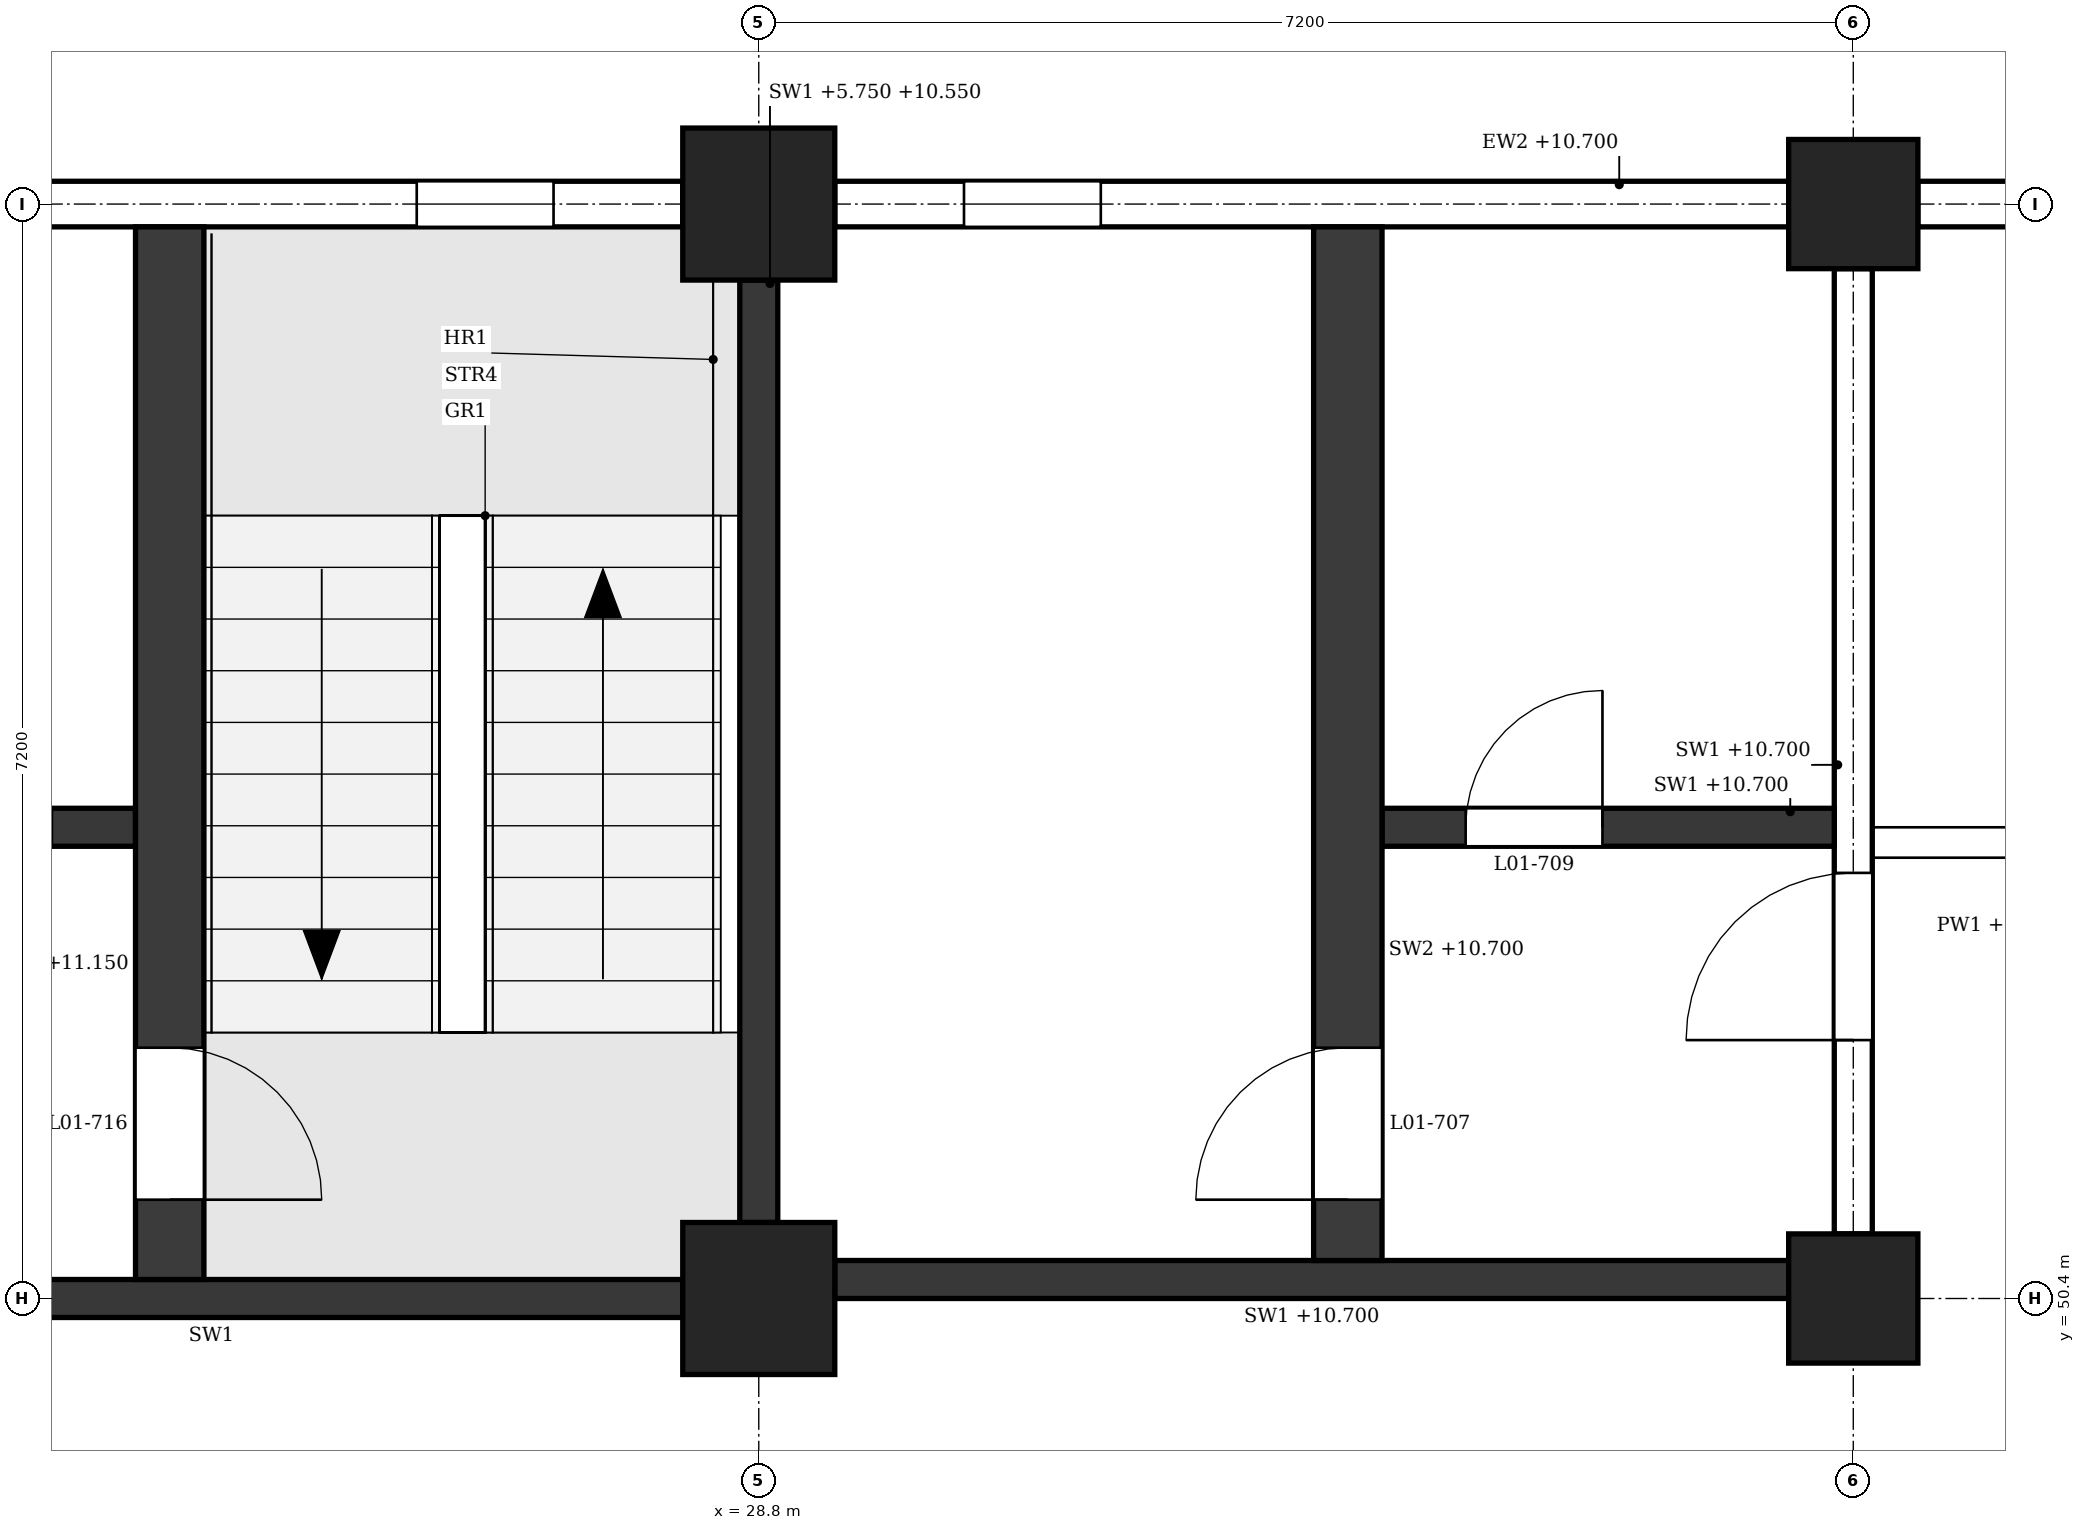
"""IFC4 building model, lengths in metres.
Left out: names, types, materials, properties, quantities, classifications, styles, units other than length and angle.
Written with IfcOpenShell. Run it as: python <this file> out.ifc"""

import sys

from ifc_helpers import new_model, si_unit, direction, frame, frame_2d, origin, origin_2d, place, context, subcontext, project, spatial, polyline, rectangle, outline, extrude, element, fill, save


model = new_model("IFC4")
c1 = context("Model", 3, precision=1e-05, world=origin(), true_north=direction((0.0, 1.0)))
c2 = subcontext(c1, "Body", "Model", "MODEL_VIEW")
j1 = project(units=[si_unit("LENGTHUNIT", "METRE"), si_unit("PLANEANGLEUNIT", "RADIAN")], contexts=[c1])
p1 = place(None, origin())
s1 = spatial("IfcSite", under=j1, at=p1, CompositionType="ELEMENT")
p2 = place(p1, origin())
s2 = spatial("IfcBuilding", under=s1, at=p2, CompositionType="ELEMENT")
p3 = place(p2, frame((0.0, 0.0, 6.0)))
s3 = spatial("IfcBuildingStorey", under=s2, at=p3, CompositionType="ELEMENT", Elevation=6.0)
for number, where, z_axis, x_axis in (
    (1, (28.8, 50.4, 0.0), (0.0, 0.0, 1.0), (1.0, 0.0, 0.0)),
    (2, (28.8, 57.6, 0.0), (0.0, 0.0, 1.0), (1.0, 0.0, 0.0)),
):
    element("IfcColumn", number, at=place(p3, frame(where, z_axis=z_axis, x_axis=x_axis)), inside=s3, PredefinedType="COLUMN", context=c2, shape_type="SweptSolid", body=[
        extrude(rectangle(XDim=1.0, YDim=1.0, at=origin_2d()), origin(), (0.0, 0.0, 1.0), 5.4),
    ])
for number, where, z_axis, x_axis in (
    (3, (36.0, 50.4, 0.0), (0.0, 0.0, 1.0), (1.0, 0.0, 0.0)),
    (4, (36.0, 57.6, 0.0), (0.0, 0.0, 1.0), (1.0, 0.0, 0.0)),
):
    element("IfcColumn", number, at=place(p3, frame(where, z_axis=z_axis, x_axis=x_axis)), inside=s3, PredefinedType="COLUMN", context=c2, shape_type="SweptSolid", body=[
        extrude(rectangle(XDim=0.85, YDim=0.85, at=origin_2d()), origin(), (0.0, 0.0, 1.0), 5.4),
    ])
p4 = place(p3, frame((42.775, 57.6, 0.0), z_axis=(0.0, 0.0, 1.0), x_axis=(-1.0, 0.0, 0.0)))
e5 = element("IfcWall", 5, at=p4, inside=s3, PredefinedType="STANDARD", context=c2, shape_type="SweptSolid", body=[
    extrude(rectangle(XDim=6.35, YDim=0.3, at=frame_2d((3.175, 0.0))), origin(), (0.0, 0.0, 1.0), 4.7),
])
p5 = place(p4, frame((0.625, 0.0, 0.9)))
e6 = element("IfcOpeningElement", 6, at=p5, cuts=e5, PredefinedType="OPENING", context=c2, shape_type="SweptSolid", body=[
    extrude(outline(polyline([(0.0, 0.0), (1.5, 0.0), (1.5, 2.85), (0.75, 3.6), (0.0, 2.85), (0.0, 0.0)])), frame((0.0, 0.16, 0.0), z_axis=(0.0, -1.0, 0.0), x_axis=(1.0, 0.0, 0.0)), (0.0, 0.0, 1.0), 0.32),
])
p6 = place(p4, frame((4.225, 0.0, 0.9)))
e7 = element("IfcOpeningElement", 7, at=p6, cuts=e5, PredefinedType="OPENING", context=c2, shape_type="SweptSolid", body=[
    extrude(outline(polyline([(0.0, 0.0), (1.5, 0.0), (1.5, 2.85), (0.75, 3.6), (0.0, 2.85), (0.0, 0.0)])), frame((0.0, 0.16, 0.0), z_axis=(0.0, -1.0, 0.0), x_axis=(1.0, 0.0, 0.0)), (0.0, 0.0, 1.0), 0.32),
])
p7 = place(p3, frame((35.575, 57.6, 0.0), z_axis=(0.0, 0.0, 1.0), x_axis=(-1.0, 0.0, 0.0)))
e8 = element("IfcWall", 8, at=p7, inside=s3, PredefinedType="STANDARD", context=c2, shape_type="SweptSolid", body=[
    extrude(rectangle(XDim=6.275, YDim=0.3, at=frame_2d((3.137, 0.0))), origin(), (0.0, 0.0, 1.0), 4.7),
])
p8 = place(p7, frame((4.525, 0.0, 0.9)))
e9 = element("IfcOpeningElement", 9, at=p8, cuts=e8, PredefinedType="OPENING", context=c2, shape_type="SweptSolid", body=[
    extrude(outline(polyline([(0.0, 0.0), (0.9, 0.0), (0.9, 3.15), (0.45, 3.6), (0.0, 3.15), (0.0, 0.0)])), frame((0.0, 0.16, 0.0), z_axis=(0.0, -1.0, 0.0), x_axis=(1.0, 0.0, 0.0)), (0.0, 0.0, 1.0), 0.32),
])
p9 = place(p3, frame((28.3, 57.6, 0.0), z_axis=(0.0, 0.0, 1.0), x_axis=(-1.0, 0.0, 0.0)))
e10 = element("IfcWall", 10, at=p9, inside=s3, PredefinedType="STANDARD", context=c2, shape_type="SweptSolid", body=[
    extrude(rectangle(XDim=6.2, YDim=0.3, at=frame_2d((3.1, 0.0))), origin(), (0.0, 0.0, 1.0), 4.55),
])
p10 = place(p9, frame((0.85, 0.0, 0.9)))
e11 = element("IfcOpeningElement", 11, at=p10, cuts=e10, PredefinedType="OPENING", context=c2, shape_type="SweptSolid", body=[
    extrude(outline(polyline([(0.0, 0.0), (0.9, 0.0), (0.9, 3.15), (0.45, 3.6), (0.0, 3.15), (0.0, 0.0)])), frame((0.0, 0.16, 0.0), z_axis=(0.0, -1.0, 0.0), x_axis=(1.0, 0.0, 0.0)), (0.0, 0.0, 1.0), 0.32),
])
p11 = place(p3, frame((29.3, 50.525, 0.0), z_axis=(0.0, 0.0, 1.0), x_axis=(1.0, 0.0, 0.0)))
e12 = element("IfcWall", 12, at=p11, inside=s3, PredefinedType="SHEAR", context=c2, shape_type="SweptSolid", body=[
    extrude(rectangle(XDim=6.275, YDim=0.25, at=frame_2d((3.137, 0.0))), origin(), (0.0, 0.0, 1.0), 4.7),
])
p12 = place(p3, frame((28.8, 50.9, -0.25), z_axis=(0.0, 0.0, 1.0), x_axis=(0.0, 1.0, 0.0)))
e13 = element("IfcWall", 13, at=p12, inside=s3, PredefinedType="SHEAR", context=c2, shape_type="SweptSolid", body=[
    extrude(rectangle(XDim=6.2, YDim=0.25, at=frame_2d((3.1, 0.0))), origin(), (0.0, 0.0, 1.0), 4.8),
])
p13 = place(p3, frame((36.0, 50.825, 0.0), z_axis=(0.0, 0.0, 1.0), x_axis=(0.0, 1.0, 0.0)))
e14 = element("IfcWall", 14, at=p13, inside=s3, PredefinedType="SHEAR", context=c2, shape_type="SweptSolid", body=[
    extrude(rectangle(XDim=6.35, YDim=0.25, at=frame_2d((3.175, 0.0))), origin(), (0.0, 0.0, 1.0), 4.7),
])
p14 = place(p13, frame((1.275, 0.0, 0.0)))
e15 = element("IfcOpeningElement", 15, at=p14, cuts=e14, PredefinedType="OPENING", context=c2, shape_type="SweptSolid", body=[
    extrude(rectangle(XDim=1.1, YDim=2.1, at=frame_2d((0.55, 1.05))), frame((0.0, 0.135, 0.0), z_axis=(0.0, -1.0, 0.0), x_axis=(1.0, 0.0, 0.0)), (0.0, 0.0, 1.0), 0.27),
])
p15 = place(p3, frame((32.675, 50.65, 0.0), z_axis=(0.0, 0.0, 1.0), x_axis=(0.0, 1.0, 0.0)))
e16 = element("IfcWall", 16, at=p15, inside=s3, PredefinedType="SHEAR", context=c2, shape_type="SweptSolid", body=[
    extrude(rectangle(XDim=6.8, YDim=0.45, at=frame_2d((3.4, 0.0))), origin(), (0.0, 0.0, 1.0), 4.7),
])
p16 = place(p15, frame((0.4, 0.0, 0.0)))
e17 = element("IfcOpeningElement", 17, at=p16, cuts=e16, PredefinedType="OPENING", context=c2, shape_type="SweptSolid", body=[
    extrude(rectangle(XDim=1.0, YDim=2.1, at=frame_2d((0.5, 1.05))), frame((0.0, 0.235, 0.0), z_axis=(0.0, -1.0, 0.0), x_axis=(1.0, 0.0, 0.0)), (0.0, 0.0, 1.0), 0.47),
])
p17 = place(p3, frame((32.9, 53.5, 0.0), z_axis=(0.0, 0.0, 1.0), x_axis=(1.0, 0.0, 0.0)))
e18 = element("IfcWall", 18, at=p17, inside=s3, PredefinedType="SHEAR", context=c2, shape_type="SweptSolid", body=[
    extrude(rectangle(XDim=2.975, YDim=0.25, at=frame_2d((1.488, 0.0))), origin(), (0.0, 0.0, 1.0), 4.7),
])
p18 = place(p17, frame((0.55, 0.0, 0.0)))
e19 = element("IfcOpeningElement", 19, at=p18, cuts=e18, PredefinedType="OPENING", context=c2, shape_type="SweptSolid", body=[
    extrude(rectangle(XDim=0.9, YDim=2.1, at=frame_2d((0.45, 1.05))), frame((0.0, 0.135, 0.0), z_axis=(0.0, -1.0, 0.0), x_axis=(1.0, 0.0, 0.0)), (0.0, 0.0, 1.0), 0.27),
])
p19 = place(p3, frame((22.1, 50.4, 0.0), z_axis=(0.0, 0.0, 1.0), x_axis=(1.0, 0.0, 0.0)))
e20 = element("IfcWall", 20, at=p19, inside=s3, PredefinedType="SHEAR", context=c2, shape_type="SweptSolid", body=[
    extrude(rectangle(XDim=6.2, YDim=0.25, at=frame_2d((3.1, 0.0))), origin(), (0.0, 0.0, 1.0), 4.4),
])
p20 = place(p19, frame((0.35, 0.0, 0.0)))
e21 = element("IfcOpeningElement", 21, at=p20, cuts=e20, PredefinedType="OPENING", context=c2, shape_type="SweptSolid", body=[
    extrude(rectangle(XDim=1.1, YDim=2.1, at=frame_2d((0.55, 1.05))), frame((0.0, 0.135, 0.0), z_axis=(0.0, -1.0, 0.0), x_axis=(1.0, 0.0, 0.0)), (0.0, 0.0, 1.0), 0.27),
])
p21 = place(p3, frame((24.925, 50.525, 0.0), z_axis=(0.0, 0.0, 1.0), x_axis=(0.0, 1.0, 0.0)))
e22 = element("IfcWall", 22, at=p21, inside=s3, PredefinedType="SHEAR", context=c2, shape_type="SweptSolid", body=[
    extrude(rectangle(XDim=6.925, YDim=0.45, at=frame_2d((3.462, 0.0))), origin(), (0.0, 0.0, 1.0), 5.15),
])
p22 = place(p21, frame((0.525, 0.0, 0.0)))
e23 = element("IfcOpeningElement", 23, at=p22, cuts=e22, PredefinedType="OPENING", context=c2, shape_type="SweptSolid", body=[
    extrude(rectangle(XDim=1.0, YDim=2.1, at=frame_2d((0.5, 1.05))), frame((0.0, 0.235, 0.0), z_axis=(0.0, -1.0, 0.0), x_axis=(1.0, 0.0, 0.0)), (0.0, 0.0, 1.0), 0.47),
])
p23 = place(p3, frame((21.725, 53.5, 0.0), z_axis=(0.0, 0.0, 1.0), x_axis=(1.0, 0.0, 0.0)))
e24 = element("IfcWall", 24, at=p23, inside=s3, PredefinedType="SHEAR", context=c2, shape_type="SweptSolid", body=[
    extrude(rectangle(XDim=2.975, YDim=0.25, at=frame_2d((1.487, 0.0))), origin(), (0.0, 0.0, 1.0), 5.15),
])
p24 = place(p23, frame((1.525, 0.0, 0.0)))
e25 = element("IfcOpeningElement", 25, at=p24, cuts=e24, PredefinedType="OPENING", context=c2, shape_type="SweptSolid", body=[
    extrude(rectangle(XDim=0.9, YDim=2.1, at=frame_2d((0.45, 1.05))), frame((0.0, 0.135, 0.0), z_axis=(0.0, -1.0, 0.0), x_axis=(1.0, 0.0, 0.0)), (0.0, 0.0, 1.0), 0.27),
])
p25 = place(p2, origin())
s4 = spatial("IfcBuildingStorey", under=s2, at=p25, CompositionType="ELEMENT", Elevation=0.0)
p26 = place(p25, frame((29.3, 50.2, 0.0), z_axis=(0.0, 0.0, 1.0), x_axis=(1.0, 0.0, 0.0)))
e26 = element("IfcWall", 26, at=p26, inside=s4, PredefinedType="SOLIDWALL", context=c2, shape_type="SweptSolid", body=[
    extrude(rectangle(XDim=6.275, YDim=0.4, at=frame_2d((3.137, 0.0))), origin(), (0.0, 0.0, 1.0), 10.7),
])
p27 = place(p25, frame((36.425, 50.2, 0.0), z_axis=(0.0, 0.0, 1.0), x_axis=(1.0, 0.0, 0.0)))
e27 = element("IfcWall", 27, at=p27, inside=s4, PredefinedType="SOLIDWALL", context=c2, shape_type="SweptSolid", body=[
    extrude(rectangle(XDim=6.35, YDim=0.4, at=frame_2d((3.175, 0.0))), origin(), (0.0, 0.0, 1.0), 10.7),
])
p28 = place(p25, frame((29.0, 43.7, 0.0), z_axis=(0.0, 0.0, 1.0), x_axis=(0.0, 1.0, 0.0)))
e28 = element("IfcWall", 28, at=p28, inside=s4, PredefinedType="SOLIDWALL", context=c2, shape_type="SweptSolid", body=[
    extrude(rectangle(XDim=6.2, YDim=0.4, at=frame_2d((3.1, 0.0))), origin(), (0.0, 0.0, 1.0), 10.55),
])
p29 = place(p3, frame((36.125, 53.4, 0.0), z_axis=(0.0, 0.0, 1.0), x_axis=(1.0, 0.0, 0.0)))
e29 = element("IfcWall", 29, at=p29, inside=s3, PredefinedType="PARTITIONING", context=c2, shape_type="SweptSolid", body=[
    extrude(rectangle(XDim=7.075, YDim=0.2, at=frame_2d((3.538, 0.0))), origin(), (0.0, 0.0, 1.0), 4.7),
])
p30 = place(p29, frame((1.238, 0.0, 0.0)))
e30 = element("IfcOpeningElement", 30, at=p30, cuts=e29, PredefinedType="OPENING", context=c2, shape_type="SweptSolid", body=[
    extrude(rectangle(XDim=1.0, YDim=2.1, at=frame_2d((0.5, 1.05))), frame((0.0, 0.11, 0.0), z_axis=(0.0, -1.0, 0.0), x_axis=(1.0, 0.0, 0.0)), (0.0, 0.0, 1.0), 0.22),
])
p31 = place(p8, origin())
e31 = element("IfcWindow", 31, at=p31, inside=s3, PartitioningType="SINGLE_PANEL", PredefinedType="WINDOW", context=c2, shape_type="SweptSolid", body=[
    extrude(outline(polyline([(0.0, 0.0), (0.9, 0.0), (0.9, 3.15), (0.45, 3.6), (0.0, 3.15), (0.0, 0.0)])), frame((0.0, 0.03, 0.0), z_axis=(0.0, -1.0, 0.0), x_axis=(1.0, 0.0, 0.0)), (0.0, 0.0, 1.0), 0.06),
])
fill(e9, e31)
p32 = place(p10, origin())
e32 = element("IfcWindow", 32, at=p32, inside=s3, PartitioningType="SINGLE_PANEL", PredefinedType="WINDOW", context=c2, shape_type="SweptSolid", body=[
    extrude(outline(polyline([(0.0, 0.0), (0.9, 0.0), (0.9, 3.15), (0.45, 3.6), (0.0, 3.15), (0.0, 0.0)])), frame((0.0, 0.03, 0.0), z_axis=(0.0, -1.0, 0.0), x_axis=(1.0, 0.0, 0.0)), (0.0, 0.0, 1.0), 0.06),
])
fill(e11, e32)
p33 = place(p16, origin())
e33 = element("IfcDoor", 33, at=p33, inside=s3, OperationType="SINGLE_SWING_LEFT", PredefinedType="DOOR", context=c2, shape_type="SweptSolid", body=[
    extrude(rectangle(XDim=1.0, YDim=2.1, at=frame_2d((0.5, 1.05))), frame((0.0, 0.025, 0.0), z_axis=(0.0, -1.0, 0.0), x_axis=(1.0, 0.0, 0.0)), (0.0, 0.0, 1.0), 0.05),
])
fill(e17, e33)
p34 = place(p14, origin())
e34 = element("IfcDoor", 34, at=p34, inside=s3, OperationType="SINGLE_SWING_LEFT", PredefinedType="DOOR", context=c2, shape_type="SweptSolid", body=[
    extrude(rectangle(XDim=1.1, YDim=2.1, at=frame_2d((0.55, 1.05))), frame((0.0, 0.025, 0.0), z_axis=(0.0, -1.0, 0.0), x_axis=(1.0, 0.0, 0.0)), (0.0, 0.0, 1.0), 0.05),
])
fill(e15, e34)
p35 = place(p18, origin())
e35 = element("IfcDoor", 35, at=p35, inside=s3, OperationType="SINGLE_SWING_RIGHT", PredefinedType="DOOR", context=c2, shape_type="SweptSolid", body=[
    extrude(rectangle(XDim=0.9, YDim=2.1, at=frame_2d((0.45, 1.05))), frame((0.0, 0.025, 0.0), z_axis=(0.0, -1.0, 0.0), x_axis=(1.0, 0.0, 0.0)), (0.0, 0.0, 1.0), 0.05),
])
fill(e19, e35)
p36 = place(p22, frame((1.0, 0.0, 0.0), z_axis=(0.0, 0.0, 1.0), x_axis=(-1.0, 0.0, 0.0)))
e36 = element("IfcDoor", 36, at=p36, inside=s3, OperationType="SINGLE_SWING_RIGHT", PredefinedType="DOOR", context=c2, shape_type="SweptSolid", body=[
    extrude(rectangle(XDim=1.0, YDim=2.1, at=frame_2d((0.5, 1.05))), frame((0.0, 0.025, 0.0), z_axis=(0.0, -1.0, 0.0), x_axis=(1.0, 0.0, 0.0)), (0.0, 0.0, 1.0), 0.05),
])
fill(e23, e36)
save(model, sys.argv[1])
